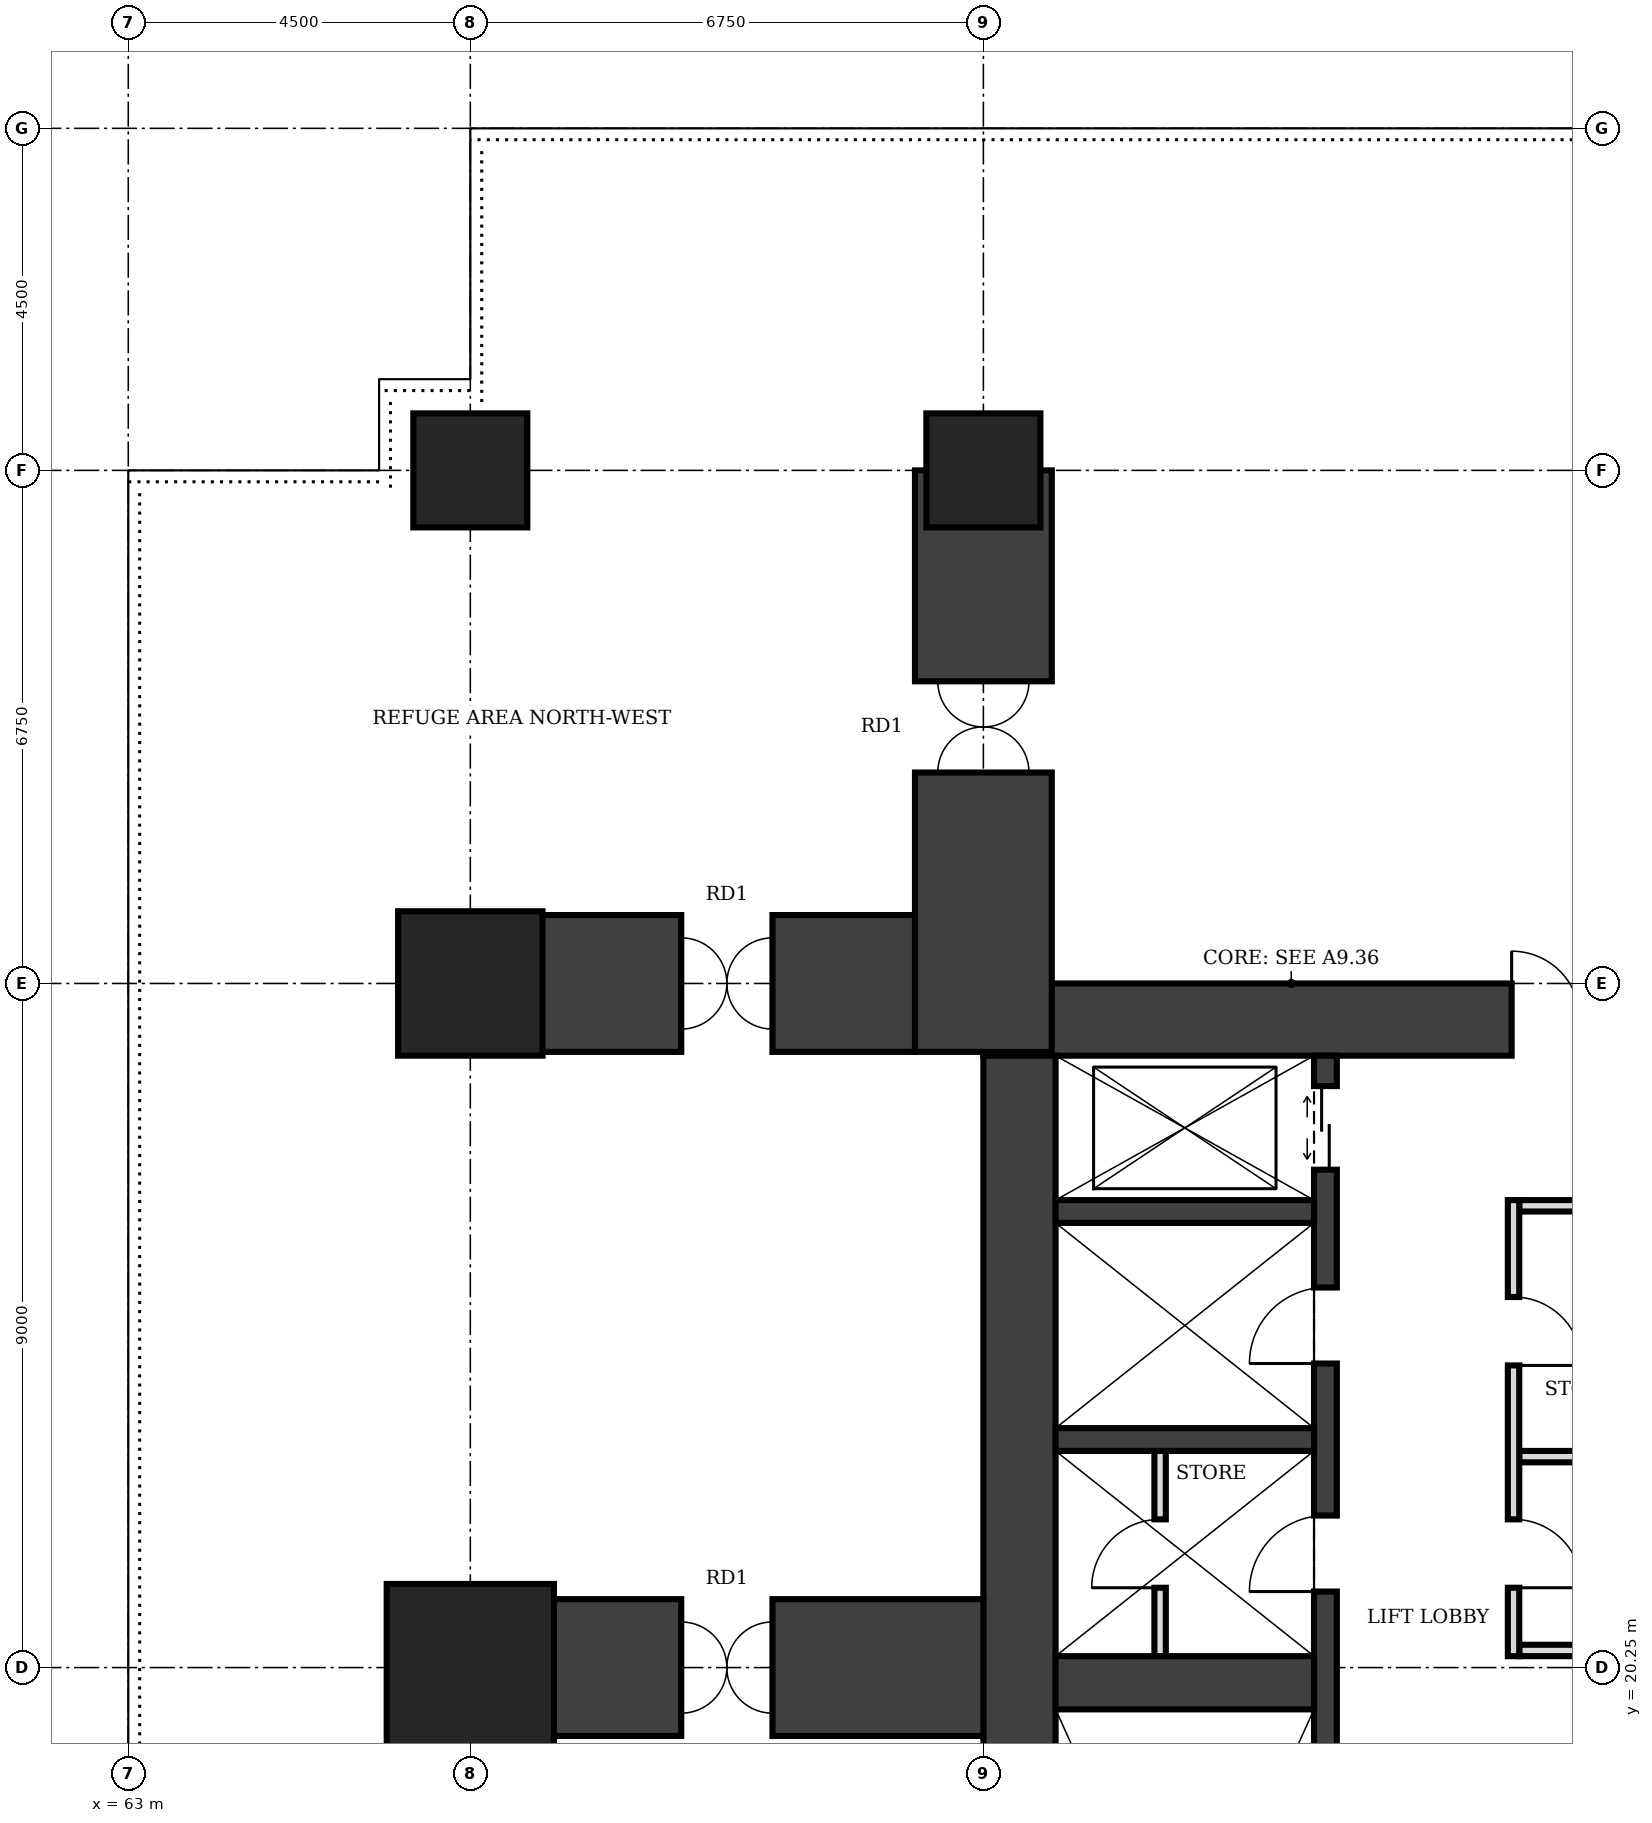
"""IFC4 building model, lengths in metres.
Left out: names, types, materials, properties, quantities, classifications, styles, units other than length and angle.
Written with IfcOpenShell. Run it as: python <this file> out.ifc"""

import sys

from ifc_helpers import new_model, si_unit, direction, frame, frame_2d, origin, origin_2d, place, context, subcontext, project, spatial, rectangle, extrude, element, fill, save


model = new_model("IFC4")
c1 = context("Model", 3, precision=1e-05, world=origin(), true_north=direction((0.0, 1.0)))
c2 = subcontext(c1, "Body", "Model", "MODEL_VIEW")
j1 = project(units=[si_unit("LENGTHUNIT", "METRE"), si_unit("PLANEANGLEUNIT", "RADIAN")], contexts=[c1])
p1 = place(None, origin())
s1 = spatial("IfcSite", under=j1, at=p1, CompositionType="ELEMENT")
p2 = place(p1, origin())
s2 = spatial("IfcBuilding", under=s1, at=p2, CompositionType="ELEMENT")
p3 = place(p2, frame((0.0, 0.0, 169.0)))
s3 = spatial("IfcBuildingStorey", under=s2, at=p3, CompositionType="ELEMENT", Elevation=169.0)
p4 = place(p3, frame((87.75, 28.775, 0.0), z_axis=(0.0, 0.0, 1.0), x_axis=(-1.0, 0.0, 0.0)))
e1 = element("IfcWall", 1, at=p4, inside=s3, PredefinedType="SHEAR", context=c2, shape_type="SweptSolid", body=[
    extrude(rectangle(XDim=13.5, YDim=0.95, at=frame_2d((6.75, 0.0))), origin(), (0.0, 0.0, 1.0), 8.0),
])
p5 = place(p4, frame((4.75, 0.0, 0.0)))
e2 = element("IfcOpeningElement", 2, at=p5, cuts=e1, PredefinedType="OPENING", context=c2, shape_type="SweptSolid", body=[
    extrude(rectangle(XDim=1.8, YDim=2.1, at=frame_2d((0.9, 1.05))), frame((0.0, 0.485, 0.0), z_axis=(0.0, -1.0, 0.0), x_axis=(1.0, 0.0, 0.0)), (0.0, 0.0, 1.0), 0.97),
])
p6 = place(p3, frame((74.725, 28.3, 0.0), z_axis=(0.0, 0.0, 1.0), x_axis=(0.0, -1.0, 0.0)))
e3 = element("IfcWall", 3, at=p6, inside=s3, PredefinedType="SHEAR", context=c2, shape_type="SweptSolid", body=[
    extrude(rectangle(XDim=16.1, YDim=0.95, at=frame_2d((8.05, 0.0))), origin(), (0.0, 0.0, 1.0), 8.0),
])
p7 = place(p3, frame((78.75, 12.2, 0.0), z_axis=(0.0, 0.0, 1.0), x_axis=(0.0, 1.0, 0.0)))
e4 = element("IfcWall", 4, at=p7, inside=s3, PredefinedType="SHEAR", context=c2, shape_type="SweptSolid", body=[
    extrude(rectangle(XDim=16.1, YDim=0.3, at=frame_2d((8.05, 0.0))), origin(), (0.0, 0.0, 1.0), 8.0),
])
p8 = place(p7, frame((0.4, 0.0, 0.0)))
e5 = element("IfcOpeningElement", 5, at=p8, cuts=e4, PredefinedType="OPENING", context=c2, shape_type="SweptSolid", body=[
    extrude(rectangle(XDim=1.0, YDim=2.1, at=frame_2d((0.5, 1.05))), frame((0.0, 0.16, 0.0), z_axis=(0.0, -1.0, 0.0), x_axis=(1.0, 0.0, 0.0)), (0.0, 0.0, 1.0), 0.32),
])
p9 = place(p7, frame((14.6, 0.0, 0.0)))
e6 = element("IfcOpeningElement", 6, at=p9, cuts=e4, PredefinedType="OPENING", context=c2, shape_type="SweptSolid", body=[
    extrude(rectangle(XDim=1.1, YDim=2.1, at=frame_2d((0.55, 1.05))), frame((0.0, 0.16, 0.0), z_axis=(0.0, -1.0, 0.0), x_axis=(1.0, 0.0, 0.0)), (0.0, 0.0, 1.0), 0.32),
])
p10 = place(p7, frame((9.05, 0.0, 0.0)))
e7 = element("IfcOpeningElement", 7, at=p10, cuts=e4, PredefinedType="OPENING", context=c2, shape_type="SweptSolid", body=[
    extrude(rectangle(XDim=1.0, YDim=2.1, at=frame_2d((0.5, 1.05))), frame((0.0, 0.16, 0.0), z_axis=(0.0, -1.0, 0.0), x_axis=(1.0, 0.0, 0.0)), (0.0, 0.0, 1.0), 0.32),
])
p11 = place(p7, frame((12.05, 0.0, 0.0)))
e8 = element("IfcOpeningElement", 8, at=p11, cuts=e4, PredefinedType="OPENING", context=c2, shape_type="SweptSolid", body=[
    extrude(rectangle(XDim=1.0, YDim=2.1, at=frame_2d((0.5, 1.05))), frame((0.0, 0.16, 0.0), z_axis=(0.0, -1.0, 0.0), x_axis=(1.0, 0.0, 0.0)), (0.0, 0.0, 1.0), 0.32),
])
p12 = place(p3, frame((75.2, 20.05, 0.0), z_axis=(0.0, 0.0, 1.0), x_axis=(1.0, 0.0, 0.0)))
e9 = element("IfcWall", 9, at=p12, inside=s3, PredefinedType="SHEAR", context=c2, shape_type="SweptSolid", body=[
    extrude(rectangle(XDim=3.4, YDim=0.7, at=frame_2d((1.7, 0.0))), origin(), (0.0, 0.0, 1.0), 8.0),
])
for number, where, z_axis, x_axis in (
    (10, (75.2, 23.25, 0.0), (0.0, 0.0, 1.0), (1.0, 0.0, 0.0)),
    (11, (75.2, 26.25, 0.0), (0.0, 0.0, 1.0), (1.0, 0.0, 0.0)),
):
    element("IfcWall", number, at=place(p3, frame(where, z_axis=z_axis, x_axis=x_axis)), inside=s3, PredefinedType="SHEAR", context=c2, shape_type="SweptSolid", body=[
        extrude(rectangle(XDim=3.4, YDim=0.3, at=frame_2d((1.7, 0.0))), origin(), (0.0, 0.0, 1.0), 8.0),
    ])
p13 = place(p3, frame((67.5, 20.25, 0.0), z_axis=(0.0, 0.0, 1.0), x_axis=(1.0, 0.0, 0.0)))
e12 = element("IfcColumn", 12, at=p13, inside=s3, PredefinedType="COLUMN", context=c2, shape_type="SweptSolid", body=[
    extrude(rectangle(XDim=2.2, YDim=2.2, at=origin_2d()), origin(), (0.0, 0.0, 1.0), 8.0),
])
p14 = place(p3, frame((67.5, 29.25, 0.0), z_axis=(0.0, 0.0, 1.0), x_axis=(1.0, 0.0, 0.0)))
e13 = element("IfcColumn", 13, at=p14, inside=s3, PredefinedType="COLUMN", context=c2, shape_type="SweptSolid", body=[
    extrude(rectangle(XDim=1.9, YDim=1.9, at=origin_2d()), origin(), (0.0, 0.0, 1.0), 8.0),
])
for number, where, z_axis, x_axis in (
    (14, (67.5, 36.0, 0.0), (0.0, 0.0, 1.0), (1.0, 0.0, 0.0)),
    (15, (74.25, 36.0, 0.0), (0.0, 0.0, 1.0), (1.0, 0.0, 0.0)),
):
    element("IfcColumn", number, at=place(p3, frame(where, z_axis=z_axis, x_axis=x_axis)), inside=s3, PredefinedType="COLUMN", context=c2, shape_type="SweptSolid", body=[
        extrude(rectangle(XDim=1.5, YDim=1.5, at=origin_2d()), origin(), (0.0, 0.0, 1.0), 8.0),
    ])
p15 = place(p3, frame((74.25, 28.35, 0.0), z_axis=(0.0, 0.0, 1.0), x_axis=(0.0, 1.0, 0.0)))
e16 = element("IfcWall", 16, at=p15, inside=s3, PredefinedType="SHEAR", context=c2, shape_type="SweptSolid", body=[
    extrude(rectangle(XDim=7.65, YDim=1.8, at=frame_2d((3.825, 0.0))), origin(), (0.0, 0.0, 1.0), 8.0),
])
p16 = place(p15, frame((3.675, 0.0, 0.0)))
e17 = element("IfcOpeningElement", 17, at=p16, cuts=e16, PredefinedType="OPENING", context=c2, shape_type="SweptSolid", body=[
    extrude(rectangle(XDim=1.2, YDim=2.1, at=frame_2d((0.6, 1.05))), frame((0.0, 0.91, 0.0), z_axis=(0.0, -1.0, 0.0), x_axis=(1.0, 0.0, 0.0)), (0.0, 0.0, 1.0), 1.82),
])
p17 = place(p3, frame((67.5, 20.25, 0.0), z_axis=(0.0, 0.0, 1.0), x_axis=(1.0, 0.0, 0.0)))
e18 = element("IfcWall", 18, at=p17, inside=s3, PredefinedType="SHEAR", context=c2, shape_type="SweptSolid", body=[
    extrude(rectangle(XDim=6.75, YDim=1.8, at=frame_2d((3.375, 0.0))), origin(), (0.0, 0.0, 1.0), 8.0),
])
p18 = place(p17, frame((2.775, 0.0, 0.0)))
e19 = element("IfcOpeningElement", 19, at=p18, cuts=e18, PredefinedType="OPENING", context=c2, shape_type="SweptSolid", body=[
    extrude(rectangle(XDim=1.2, YDim=2.1, at=frame_2d((0.6, 1.05))), frame((0.0, 0.91, 0.0), z_axis=(0.0, -1.0, 0.0), x_axis=(1.0, 0.0, 0.0)), (0.0, 0.0, 1.0), 1.82),
])
p19 = place(p3, frame((67.5, 29.25, 0.0), z_axis=(0.0, 0.0, 1.0), x_axis=(1.0, 0.0, 0.0)))
e20 = element("IfcWall", 20, at=p19, inside=s3, PredefinedType="SHEAR", context=c2, shape_type="SweptSolid", body=[
    extrude(rectangle(XDim=5.85, YDim=1.8, at=frame_2d((2.925, 0.0))), origin(), (0.0, 0.0, 1.0), 8.0),
])
p20 = place(p19, frame((2.775, 0.0, 0.0)))
e21 = element("IfcOpeningElement", 21, at=p20, cuts=e20, PredefinedType="OPENING", context=c2, shape_type="SweptSolid", body=[
    extrude(rectangle(XDim=1.2, YDim=2.1, at=frame_2d((0.6, 1.05))), frame((0.0, 0.91, 0.0), z_axis=(0.0, -1.0, 0.0), x_axis=(1.0, 0.0, 0.0)), (0.0, 0.0, 1.0), 1.82),
])
p21 = place(p3, frame((81.225, 20.4, 0.0), z_axis=(0.0, 0.0, 1.0), x_axis=(0.0, 1.0, 0.0)))
e22 = element("IfcWall", 22, at=p21, inside=s3, PredefinedType="PARTITIONING", context=c2, shape_type="SweptSolid", body=[
    extrude(rectangle(XDim=6.0, YDim=0.15, at=frame_2d((3.0, 0.0))), origin(), (0.0, 0.0, 1.0), 7.75),
])
p22 = place(p21, frame((0.9, 0.0, 0.0)))
e23 = element("IfcOpeningElement", 23, at=p22, cuts=e22, PredefinedType="OPENING", context=c2, shape_type="SweptSolid", body=[
    extrude(rectangle(XDim=0.9, YDim=2.1, at=frame_2d((0.45, 1.05))), frame((0.0, 0.085, 0.0), z_axis=(0.0, -1.0, 0.0), x_axis=(1.0, 0.0, 0.0)), (0.0, 0.0, 1.0), 0.17),
])
p23 = place(p21, frame((3.825, 0.0, 0.0)))
e24 = element("IfcOpeningElement", 24, at=p23, cuts=e22, PredefinedType="OPENING", context=c2, shape_type="SweptSolid", body=[
    extrude(rectangle(XDim=0.9, YDim=2.1, at=frame_2d((0.45, 1.05))), frame((0.0, 0.085, 0.0), z_axis=(0.0, -1.0, 0.0), x_axis=(1.0, 0.0, 0.0)), (0.0, 0.0, 1.0), 0.17),
])
for number, where, z_axis, x_axis in (
    (25, (81.3, 20.475, 0.0), (0.0, 0.0, 1.0), (1.0, 0.0, 0.0)),
    (26, (81.3, 23.025, 0.0), (0.0, 0.0, 1.0), (1.0, 0.0, 0.0)),
    (27, (81.3, 26.325, 0.0), (0.0, 0.0, 1.0), (1.0, 0.0, 0.0)),
):
    element("IfcWall", number, at=place(p3, frame(where, z_axis=z_axis, x_axis=x_axis)), inside=s3, PredefinedType="PARTITIONING", context=c2, shape_type="SweptSolid", body=[
        extrude(rectangle(XDim=1.8, YDim=0.15, at=frame_2d((0.9, 0.0))), origin(), (0.0, 0.0, 1.0), 7.75),
    ])
p24 = place(p3, frame((76.575, 20.4, 0.0), z_axis=(0.0, 0.0, 1.0), x_axis=(0.0, 1.0, 0.0)))
e28 = element("IfcWall", 28, at=p24, inside=s3, PredefinedType="PARTITIONING", context=c2, shape_type="SweptSolid", body=[
    extrude(rectangle(XDim=2.7, YDim=0.15, at=frame_2d((1.35, 0.0))), origin(), (0.0, 0.0, 1.0), 7.75),
])
p25 = place(p24, frame((0.9, 0.0, 0.0)))
e29 = element("IfcOpeningElement", 29, at=p25, cuts=e28, PredefinedType="OPENING", context=c2, shape_type="SweptSolid", body=[
    extrude(rectangle(XDim=0.9, YDim=2.1, at=frame_2d((0.45, 1.05))), frame((0.0, 0.085, 0.0), z_axis=(0.0, -1.0, 0.0), x_axis=(1.0, 0.0, 0.0)), (0.0, 0.0, 1.0), 0.17),
])
p26 = place(p5, frame((1.8, 0.0, 0.0), z_axis=(0.0, 0.0, 1.0), x_axis=(-1.0, 0.0, 0.0)))
e30 = element("IfcDoor", 30, at=p26, inside=s3, OperationType="DOUBLE_DOOR_SINGLE_SWING", PredefinedType="DOOR", context=c2, shape_type="SweptSolid", body=[
    extrude(rectangle(XDim=1.8, YDim=2.1, at=frame_2d((0.9, 1.05))), frame((0.0, 0.025, 0.0), z_axis=(0.0, -1.0, 0.0), x_axis=(1.0, 0.0, 0.0)), (0.0, 0.0, 1.0), 0.05),
])
fill(e2, e30)
p27 = place(p9, origin())
e31 = element("IfcDoor", 31, at=p27, inside=s3, OperationType="DOUBLE_DOOR_SLIDING", PredefinedType="DOOR", context=c2, shape_type="SweptSolid", body=[
    extrude(rectangle(XDim=1.1, YDim=2.1, at=frame_2d((0.55, 1.05))), frame((0.0, 0.025, 0.0), z_axis=(0.0, -1.0, 0.0), x_axis=(1.0, 0.0, 0.0)), (0.0, 0.0, 1.0), 0.05),
])
fill(e6, e31)
p28 = place(p22, frame((0.9, 0.0, 0.0), z_axis=(0.0, 0.0, 1.0), x_axis=(-1.0, 0.0, 0.0)))
e32 = element("IfcDoor", 32, at=p28, inside=s3, OperationType="SINGLE_SWING_RIGHT", PredefinedType="DOOR", context=c2, shape_type="SweptSolid", body=[
    extrude(rectangle(XDim=0.9, YDim=2.1, at=frame_2d((0.45, 1.05))), frame((0.0, 0.025, 0.0), z_axis=(0.0, -1.0, 0.0), x_axis=(1.0, 0.0, 0.0)), (0.0, 0.0, 1.0), 0.05),
])
fill(e23, e32)
p29 = place(p23, frame((0.9, 0.0, 0.0), z_axis=(0.0, 0.0, 1.0), x_axis=(-1.0, 0.0, 0.0)))
e33 = element("IfcDoor", 33, at=p29, inside=s3, OperationType="SINGLE_SWING_RIGHT", PredefinedType="DOOR", context=c2, shape_type="SweptSolid", body=[
    extrude(rectangle(XDim=0.9, YDim=2.1, at=frame_2d((0.45, 1.05))), frame((0.0, 0.025, 0.0), z_axis=(0.0, -1.0, 0.0), x_axis=(1.0, 0.0, 0.0)), (0.0, 0.0, 1.0), 0.05),
])
fill(e24, e33)
p30 = place(p10, origin())
e34 = element("IfcDoor", 34, at=p30, inside=s3, OperationType="SINGLE_SWING_LEFT", PredefinedType="DOOR", context=c2, shape_type="SweptSolid", body=[
    extrude(rectangle(XDim=1.0, YDim=2.1, at=frame_2d((0.5, 1.05))), frame((0.0, 0.025, 0.0), z_axis=(0.0, -1.0, 0.0), x_axis=(1.0, 0.0, 0.0)), (0.0, 0.0, 1.0), 0.05),
])
fill(e7, e34)
p31 = place(p25, origin())
e35 = element("IfcDoor", 35, at=p31, inside=s3, OperationType="SINGLE_SWING_LEFT", PredefinedType="DOOR", context=c2, shape_type="SweptSolid", body=[
    extrude(rectangle(XDim=0.9, YDim=2.1, at=frame_2d((0.45, 1.05))), frame((0.0, 0.025, 0.0), z_axis=(0.0, -1.0, 0.0), x_axis=(1.0, 0.0, 0.0)), (0.0, 0.0, 1.0), 0.05),
])
fill(e29, e35)
p32 = place(p11, origin())
e36 = element("IfcDoor", 36, at=p32, inside=s3, OperationType="SINGLE_SWING_LEFT", PredefinedType="DOOR", context=c2, shape_type="SweptSolid", body=[
    extrude(rectangle(XDim=1.0, YDim=2.1, at=frame_2d((0.5, 1.05))), frame((0.0, 0.025, 0.0), z_axis=(0.0, -1.0, 0.0), x_axis=(1.0, 0.0, 0.0)), (0.0, 0.0, 1.0), 0.05),
])
fill(e8, e36)
p33 = place(p16, origin())
e37 = element("IfcDoor", 37, at=p33, inside=s3, OperationType="DOUBLE_DOOR_DOUBLE_SWING", PredefinedType="DOOR", context=c2, shape_type="SweptSolid", body=[
    extrude(rectangle(XDim=1.2, YDim=2.1, at=frame_2d((0.6, 1.05))), frame((0.0, 0.025, 0.0), z_axis=(0.0, -1.0, 0.0), x_axis=(1.0, 0.0, 0.0)), (0.0, 0.0, 1.0), 0.05),
])
fill(e17, e37)
p34 = place(p18, origin())
e38 = element("IfcDoor", 38, at=p34, inside=s3, OperationType="DOUBLE_DOOR_DOUBLE_SWING", PredefinedType="DOOR", context=c2, shape_type="SweptSolid", body=[
    extrude(rectangle(XDim=1.2, YDim=2.1, at=frame_2d((0.6, 1.05))), frame((0.0, 0.025, 0.0), z_axis=(0.0, -1.0, 0.0), x_axis=(1.0, 0.0, 0.0)), (0.0, 0.0, 1.0), 0.05),
])
fill(e19, e38)
p35 = place(p20, origin())
e39 = element("IfcDoor", 39, at=p35, inside=s3, OperationType="DOUBLE_DOOR_DOUBLE_SWING", PredefinedType="DOOR", context=c2, shape_type="SweptSolid", body=[
    extrude(rectangle(XDim=1.2, YDim=2.1, at=frame_2d((0.6, 1.05))), frame((0.0, 0.025, 0.0), z_axis=(0.0, -1.0, 0.0), x_axis=(1.0, 0.0, 0.0)), (0.0, 0.0, 1.0), 0.05),
])
fill(e21, e39)
save(model, sys.argv[1])
